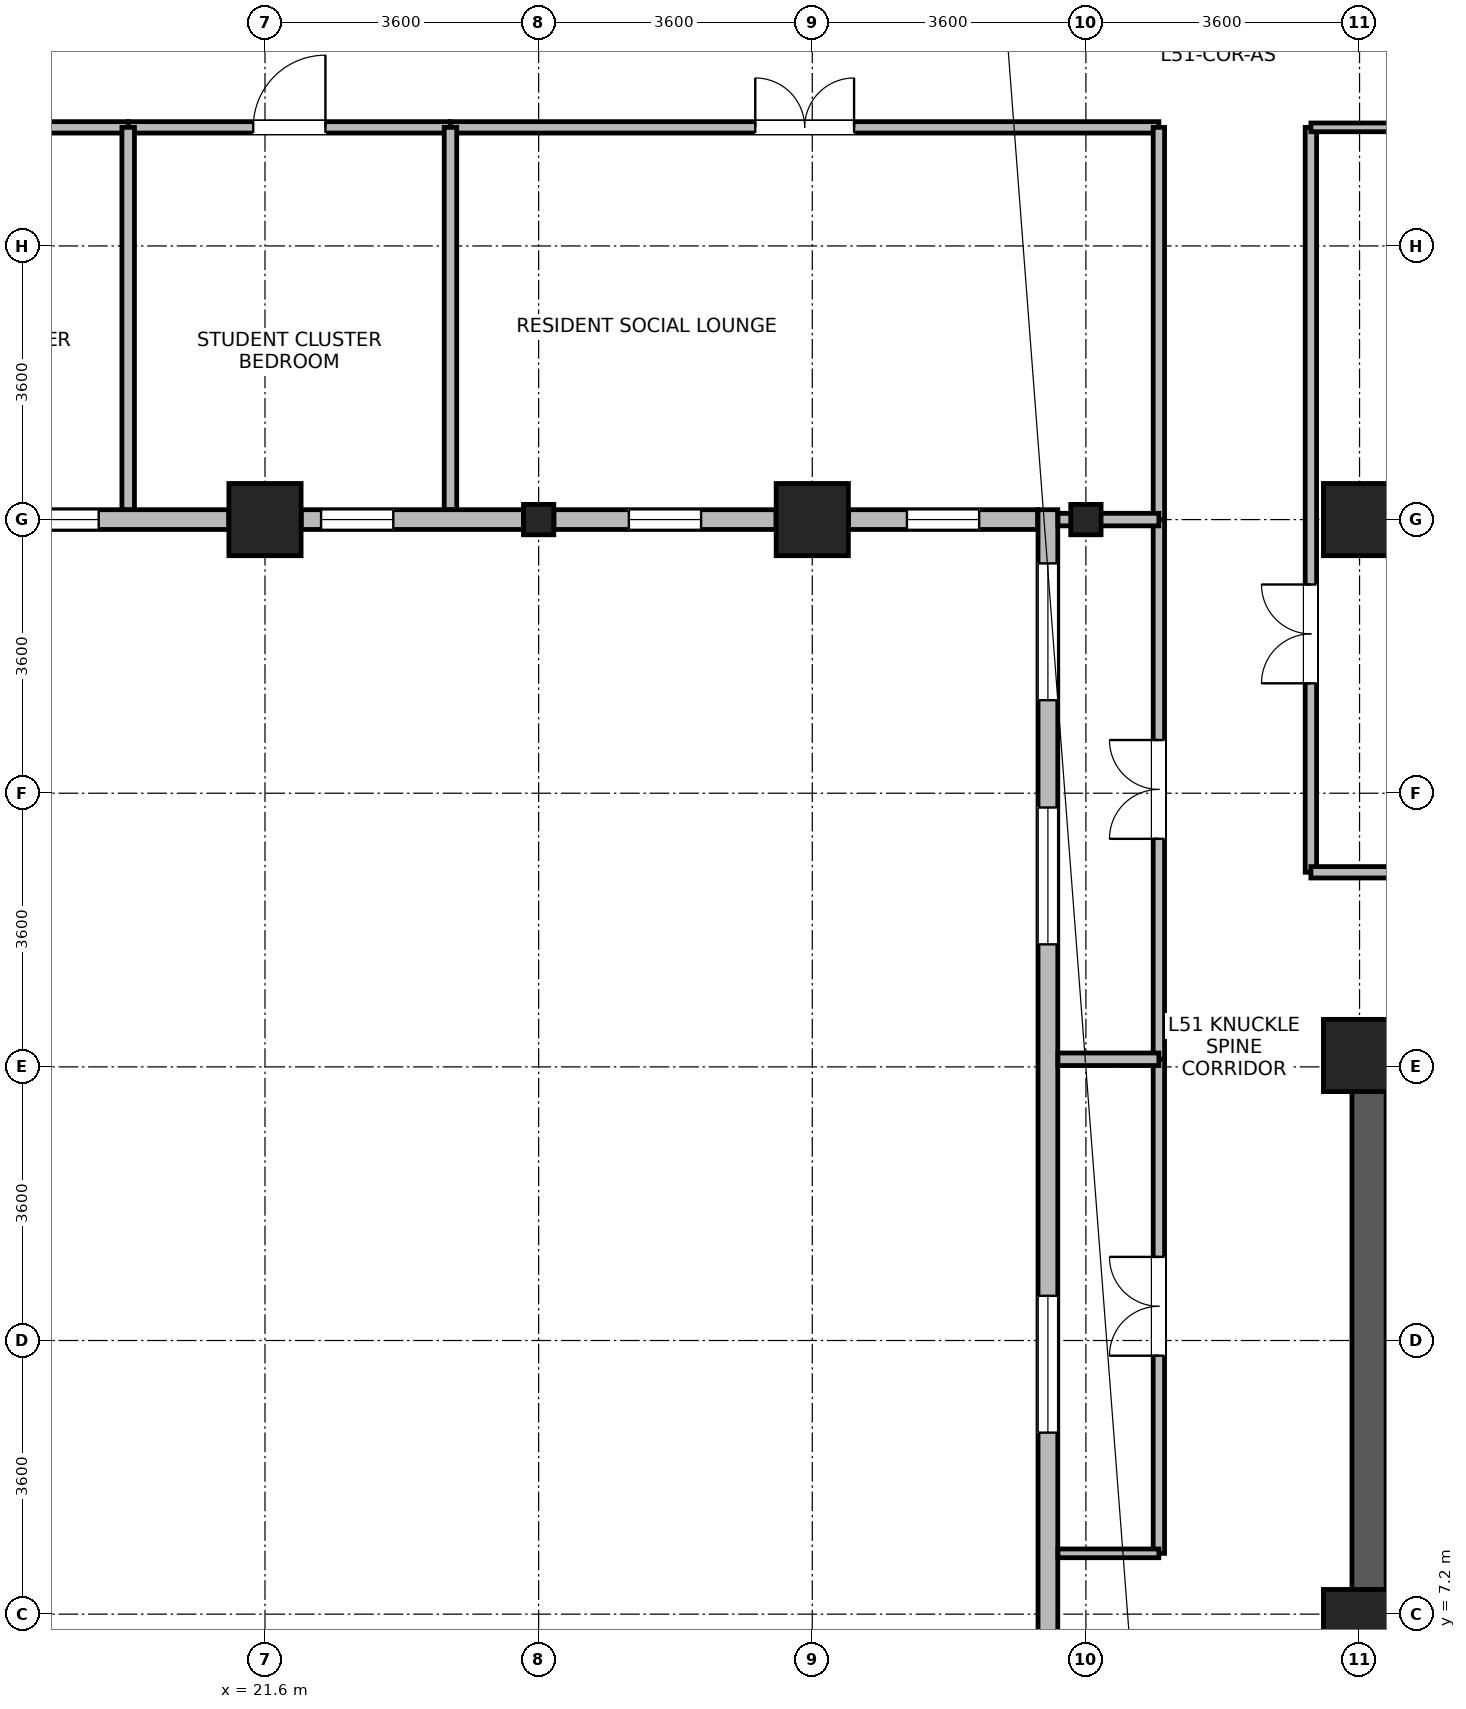
"""IFC4 building model, lengths in metres.
Left out: names, types, materials, properties, quantities, classifications, styles, units other than length and angle.
Written with IfcOpenShell. Run it as: python <this file> out.ifc"""

import sys

from ifc_helpers import new_model, si_unit, direction, frame, frame_2d, origin, origin_2d, place, context, subcontext, project, spatial, rectangle, i_section, extrude, source, transform, mapped, element, fill, save


model = new_model("IFC4")
c1 = context("Model", 3, precision=1e-05, world=origin(), true_north=direction((0.0, 1.0)))
c2 = subcontext(c1, "Body", "Model", "MODEL_VIEW")
j1 = project(units=[si_unit("LENGTHUNIT", "METRE"), si_unit("PLANEANGLEUNIT", "RADIAN")], contexts=[c1])
p1 = place(None, origin())
s1 = spatial("IfcSite", under=j1, at=p1, CompositionType="ELEMENT")
p2 = place(p1, origin())
s2 = spatial("IfcBuilding", under=s1, at=p2, CompositionType="ELEMENT")
p3 = place(p2, frame((0.0, 0.0, 201.8)))
s3 = spatial("IfcBuildingStorey", under=s2, at=p3, CompositionType="ELEMENT", Elevation=201.8)
p4 = place(p3, frame((36.125, 6.85, 0.0), z_axis=(0.0, 0.0, 1.0), x_axis=(0.0, 1.0, 0.0)))
e1 = element("IfcWall", 1, at=p4, inside=s3, PredefinedType="SHEAR", context=c2, shape_type="SweptSolid", body=[
    extrude(rectangle(XDim=7.9, YDim=0.45, at=frame_2d((3.95, 0.0))), origin(), (0.0, 0.0, 1.0), 3.47),
])
m1 = source(origin(), c2, "Body", "SweptSolid", [
    extrude(rectangle(XDim=0.95, YDim=0.95, at=origin_2d()), origin(), (0.0, 0.0, 1.0), 3.7),
])
for number, where, z_axis, x_axis in (
    (2, (21.6, 21.6, 0.0), (0.0, 0.0, 1.0), (1.0, 0.0, 0.0)),
    (3, (28.8, 21.6, 0.0), (0.0, 0.0, 1.0), (1.0, 0.0, 0.0)),
    (4, (36.0, 21.6, 0.0), (0.0, 0.0, 1.0), (1.0, 0.0, 0.0)),
    (5, (36.0, 7.05, 0.0), (0.0, 0.0, 1.0), (1.0, 0.0, 0.0)),
    (6, (36.0, 14.55, 0.0), (0.0, 0.0, 1.0), (1.0, 0.0, 0.0)),
):
    element("IfcColumn", number, at=place(p3, frame(where, z_axis=z_axis, x_axis=x_axis)), inside=s3, PredefinedType="COLUMN", context=c2, shape_type="MappedRepresentation", body=[
        mapped(m1, transform((0.0, 0.0, 0.0), x_axis=(1.0, 0.0, 0.0), y_axis=(0.0, 1.0, 0.0), z_axis=(0.0, 0.0, 1.0), scale=1.0)),
    ])
m2 = source(origin(), c2, "Body", "SweptSolid", [
    extrude(i_section(OverallWidth=0.399, OverallDepth=0.4, WebThickness=0.017, FlangeThickness=0.023, FilletRadius=0.015, at=origin_2d()), origin(), (0.0, 0.0, 1.0), 3.7),
])
for number, where, z_axis, x_axis in (
    (7, (25.2, 21.6, 0.0), (0.0, 0.0, 1.0), (1.0, 0.0, 0.0)),
    (8, (32.4, 21.6, 0.0), (0.0, 0.0, 1.0), (1.0, 0.0, 0.0)),
):
    element("IfcColumn", number, at=place(p3, frame(where, z_axis=z_axis, x_axis=x_axis)), inside=s3, PredefinedType="COLUMN", context=c2, shape_type="MappedRepresentation", body=[
        mapped(m2, transform((0.0, 0.0, 0.0), x_axis=(1.0, 0.0, 0.0), y_axis=(0.0, 1.0, 0.0), z_axis=(0.0, 0.0, 1.0), scale=1.0)),
    ])
p5 = place(p3, frame((21.124, 21.6, 0.0), z_axis=(0.0, 0.0, 1.0), x_axis=(-1.0, 0.0, 0.0)))
e9 = element("IfcWall", 9, at=p5, inside=s3, PredefinedType="STANDARD", context=c2, shape_type="SweptSolid", body=[
    extrude(rectangle(XDim=2.924, YDim=0.26, at=frame_2d((1.462, 0.0))), origin(), (0.0, 0.0, 1.0), 3.0),
])
p6 = place(p5, frame((1.712, 0.0, 0.85)))
e10 = element("IfcOpeningElement", 10, at=p6, cuts=e9, PredefinedType="OPENING", context=c2, shape_type="SweptSolid", body=[
    extrude(rectangle(XDim=0.95, YDim=1.75, at=frame_2d((0.475, 0.875))), frame((0.0, 0.14, 0.0), z_axis=(0.0, -1.0, 0.0), x_axis=(1.0, 0.0, 0.0)), (0.0, 0.0, 1.0), 0.28),
])
p7 = place(p3, frame((25.0, 21.6, 0.0), z_axis=(0.0, 0.0, 1.0), x_axis=(-1.0, 0.0, 0.0)))
e11 = element("IfcWall", 11, at=p7, inside=s3, PredefinedType="STANDARD", context=c2, shape_type="SweptSolid", body=[
    extrude(rectangle(XDim=2.924, YDim=0.26, at=frame_2d((1.462, 0.0))), origin(), (0.0, 0.0, 1.0), 3.0),
])
p8 = place(p7, frame((1.712, 0.0, 0.85)))
e12 = element("IfcOpeningElement", 12, at=p8, cuts=e11, PredefinedType="OPENING", context=c2, shape_type="SweptSolid", body=[
    extrude(rectangle(XDim=0.95, YDim=1.75, at=frame_2d((0.475, 0.875))), frame((0.0, 0.14, 0.0), z_axis=(0.0, -1.0, 0.0), x_axis=(1.0, 0.0, 0.0)), (0.0, 0.0, 1.0), 0.28),
])
p9 = place(p3, frame((28.324, 21.6, 0.0), z_axis=(0.0, 0.0, 1.0), x_axis=(-1.0, 0.0, 0.0)))
e13 = element("IfcWall", 13, at=p9, inside=s3, PredefinedType="STANDARD", context=c2, shape_type="SweptSolid", body=[
    extrude(rectangle(XDim=2.924, YDim=0.26, at=frame_2d((1.462, 0.0))), origin(), (0.0, 0.0, 1.0), 3.0),
])
p10 = place(p9, frame((0.987, 0.0, 0.85)))
e14 = element("IfcOpeningElement", 14, at=p10, cuts=e13, PredefinedType="OPENING", context=c2, shape_type="SweptSolid", body=[
    extrude(rectangle(XDim=0.95, YDim=1.75, at=frame_2d((0.475, 0.875))), frame((0.0, 0.14, 0.0), z_axis=(0.0, -1.0, 0.0), x_axis=(1.0, 0.0, 0.0)), (0.0, 0.0, 1.0), 0.28),
])
p11 = place(p3, frame((31.765, 21.6, 0.0), z_axis=(0.0, 0.0, 1.0), x_axis=(-1.0, 0.0, 0.0)))
e15 = element("IfcWall", 15, at=p11, inside=s3, PredefinedType="STANDARD", context=c2, shape_type="SweptSolid", body=[
    extrude(rectangle(XDim=2.489, YDim=0.26, at=frame_2d((1.245, 0.0))), origin(), (0.0, 0.0, 1.0), 3.0),
])
p12 = place(p11, frame((0.77, 0.0, 0.85)))
e16 = element("IfcOpeningElement", 16, at=p12, cuts=e15, PredefinedType="OPENING", context=c2, shape_type="SweptSolid", body=[
    extrude(rectangle(XDim=0.95, YDim=1.75, at=frame_2d((0.475, 0.875))), frame((0.0, 0.14, 0.0), z_axis=(0.0, -1.0, 0.0), x_axis=(1.0, 0.0, 0.0)), (0.0, 0.0, 1.0), 0.28),
])
p13 = place(p3, frame((31.9, 5.67, 0.0), z_axis=(0.0, 0.0, 1.0), x_axis=(0.0, 1.0, 0.0)))
e17 = element("IfcWall", 17, at=p13, inside=s3, PredefinedType="STANDARD", context=c2, shape_type="SweptSolid", body=[
    extrude(rectangle(XDim=16.06, YDim=0.26, at=frame_2d((8.03, 0.0))), origin(), (0.0, 0.0, 1.0), 3.45),
])
p14 = place(p13, frame((3.918, 0.0, 0.85)))
e18 = element("IfcOpeningElement", 18, at=p14, cuts=e17, PredefinedType="OPENING", context=c2, shape_type="SweptSolid", body=[
    extrude(rectangle(XDim=1.8, YDim=1.85, at=frame_2d((0.9, 0.925))), frame((0.0, 0.14, 0.0), z_axis=(0.0, -1.0, 0.0), x_axis=(1.0, 0.0, 0.0)), (0.0, 0.0, 1.0), 0.28),
])
p15 = place(p13, frame((10.342, 0.0, 0.85)))
e19 = element("IfcOpeningElement", 19, at=p15, cuts=e17, PredefinedType="OPENING", context=c2, shape_type="SweptSolid", body=[
    extrude(rectangle(XDim=1.8, YDim=1.85, at=frame_2d((0.9, 0.925))), frame((0.0, 0.14, 0.0), z_axis=(0.0, -1.0, 0.0), x_axis=(1.0, 0.0, 0.0)), (0.0, 0.0, 1.0), 0.28),
])
p16 = place(p13, frame((13.554, 0.0, 0.85)))
e20 = element("IfcOpeningElement", 20, at=p16, cuts=e17, PredefinedType="OPENING", context=c2, shape_type="SweptSolid", body=[
    extrude(rectangle(XDim=1.8, YDim=1.85, at=frame_2d((0.9, 0.925))), frame((0.0, 0.14, 0.0), z_axis=(0.0, -1.0, 0.0), x_axis=(1.0, 0.0, 0.0)), (0.0, 0.0, 1.0), 0.28),
])
p17 = place(p3, frame((35.36, 16.96, 0.0), z_axis=(0.0, 0.0, 1.0), x_axis=(0.0, 1.0, 0.0)))
e21 = element("IfcWall", 21, at=p17, inside=s3, PredefinedType="PARTITIONING", context=c2, shape_type="SweptSolid", body=[
    extrude(rectangle(XDim=9.8, YDim=0.15, at=frame_2d((4.9, 0.0))), origin(), (0.0, 0.0, 1.0), 3.45),
])
p18 = place(p17, frame((2.486, 0.0, 0.0)))
e22 = element("IfcOpeningElement", 22, at=p18, cuts=e21, PredefinedType="OPENING", context=c2, shape_type="SweptSolid", body=[
    extrude(rectangle(XDim=1.3, YDim=2.12, at=frame_2d((0.65, 1.06))), frame((0.0, 0.085, 0.0), z_axis=(0.0, -1.0, 0.0), x_axis=(1.0, 0.0, 0.0)), (0.0, 0.0, 1.0), 0.17),
])
p19 = place(p3, frame((24.04, 26.76, 0.0), z_axis=(0.0, 0.0, 1.0), x_axis=(1.0, 0.0, 0.0)))
e23 = element("IfcWall", 23, at=p19, inside=s3, PredefinedType="PARTITIONING", context=c2, shape_type="SweptSolid", body=[
    extrude(rectangle(XDim=9.32, YDim=0.15, at=frame_2d((4.66, 0.0))), origin(), (0.0, 0.0, 1.0), 3.45),
])
p20 = place(p19, frame((4.01, 0.0, 0.0)))
e24 = element("IfcOpeningElement", 24, at=p20, cuts=e23, PredefinedType="OPENING", context=c2, shape_type="SweptSolid", body=[
    extrude(rectangle(XDim=1.3, YDim=2.12, at=frame_2d((0.65, 1.06))), frame((0.0, 0.085, 0.0), z_axis=(0.0, -1.0, 0.0), x_axis=(1.0, 0.0, 0.0)), (0.0, 0.0, 1.0), 0.17),
])
p21 = place(p3, frame((35.36, 16.96, 0.0), z_axis=(0.0, 0.0, 1.0), x_axis=(1.0, 0.0, 0.0)))
e25 = element("IfcWall", 25, at=p21, inside=s3, PredefinedType="PARTITIONING", context=c2, shape_type="SweptSolid", body=[
    extrude(rectangle(XDim=9.16, YDim=0.15, at=frame_2d((4.58, 0.0))), origin(), (0.0, 0.0, 1.0), 3.45),
])
p22 = place(p3, frame((33.36, 14.5, 0.0), z_axis=(0.0, 0.0, 1.0), x_axis=(0.0, 1.0, 0.0)))
e26 = element("IfcWall", 26, at=p22, inside=s3, PredefinedType="PARTITIONING", context=c2, shape_type="SweptSolid", body=[
    extrude(rectangle(XDim=7.1, YDim=0.15, at=frame_2d((3.55, 0.0))), origin(), (0.0, 0.0, 1.0), 3.45),
])
p23 = place(p22, frame((2.9, 0.0, 0.0)))
e27 = element("IfcOpeningElement", 27, at=p23, cuts=e26, PredefinedType="OPENING", context=c2, shape_type="SweptSolid", body=[
    extrude(rectangle(XDim=1.3, YDim=2.12, at=frame_2d((0.65, 1.06))), frame((0.0, 0.085, 0.0), z_axis=(0.0, -1.0, 0.0), x_axis=(1.0, 0.0, 0.0)), (0.0, 0.0, 1.0), 0.17),
])
p24 = place(p3, frame((33.36, 8.0, 0.0), z_axis=(0.0, 0.0, 1.0), x_axis=(0.0, 1.0, 0.0)))
e28 = element("IfcWall", 28, at=p24, inside=s3, PredefinedType="PARTITIONING", context=c2, shape_type="SweptSolid", body=[
    extrude(rectangle(XDim=6.5, YDim=0.15, at=frame_2d((3.25, 0.0))), origin(), (0.0, 0.0, 1.0), 3.45),
])
p25 = place(p24, frame((2.6, 0.0, 0.0)))
e29 = element("IfcOpeningElement", 29, at=p25, cuts=e28, PredefinedType="OPENING", context=c2, shape_type="SweptSolid", body=[
    extrude(rectangle(XDim=1.3, YDim=2.12, at=frame_2d((0.65, 1.06))), frame((0.0, 0.085, 0.0), z_axis=(0.0, -1.0, 0.0), x_axis=(1.0, 0.0, 0.0)), (0.0, 0.0, 1.0), 0.17),
])
p26 = place(p3, frame((33.36, 21.6, 0.0), z_axis=(0.0, 0.0, 1.0), x_axis=(0.0, 1.0, 0.0)))
e30 = element("IfcWall", 30, at=p26, inside=s3, PredefinedType="PARTITIONING", context=c2, shape_type="SweptSolid", body=[
    extrude(rectangle(XDim=5.16, YDim=0.15, at=frame_2d((2.58, 0.0))), origin(), (0.0, 0.0, 1.0), 3.45),
])
p27 = place(p3, frame((19.8, 26.76, 0.0), z_axis=(0.0, 0.0, 1.0), x_axis=(1.0, 0.0, 0.0)))
e31 = element("IfcWall", 31, at=p27, inside=s3, PredefinedType="PARTITIONING", context=c2, shape_type="SweptSolid", body=[
    extrude(rectangle(XDim=4.24, YDim=0.15, at=frame_2d((2.12, 0.0))), origin(), (0.0, 0.0, 1.0), 3.45),
])
p28 = place(p27, frame((1.645, 0.0, 0.0)))
e32 = element("IfcOpeningElement", 32, at=p28, cuts=e31, PredefinedType="OPENING", context=c2, shape_type="SweptSolid", body=[
    extrude(rectangle(XDim=0.95, YDim=2.1, at=frame_2d((0.475, 1.05))), frame((0.0, 0.085, 0.0), z_axis=(0.0, -1.0, 0.0), x_axis=(1.0, 0.0, 0.0)), (0.0, 0.0, 1.0), 0.17),
])
p29 = place(p3, frame((15.86, 26.76, 0.0), z_axis=(0.0, 0.0, 1.0), x_axis=(1.0, 0.0, 0.0)))
e33 = element("IfcWall", 33, at=p29, inside=s3, PredefinedType="PARTITIONING", context=c2, shape_type="SweptSolid", body=[
    extrude(rectangle(XDim=3.94, YDim=0.15, at=frame_2d((1.97, 0.0))), origin(), (0.0, 0.0, 1.0), 3.45),
])
p30 = place(p29, frame((1.495, 0.0, 0.0)))
e34 = element("IfcOpeningElement", 34, at=p30, cuts=e33, PredefinedType="OPENING", context=c2, shape_type="SweptSolid", body=[
    extrude(rectangle(XDim=0.95, YDim=2.1, at=frame_2d((0.475, 1.05))), frame((0.0, 0.085, 0.0), z_axis=(0.0, -1.0, 0.0), x_axis=(1.0, 0.0, 0.0)), (0.0, 0.0, 1.0), 0.17),
])
p31 = place(p3, frame((35.36, 26.76, 0.0), z_axis=(0.0, 0.0, 1.0), x_axis=(1.0, 0.0, 0.0)))
e35 = element("IfcWall", 35, at=p31, inside=s3, PredefinedType="PARTITIONING", context=c2, shape_type="SweptSolid", body=[
    extrude(rectangle(XDim=9.16, YDim=0.115, at=frame_2d((4.58, 0.0))), origin(), (0.0, 0.0, 1.0), 3.45),
])
for number, where, z_axis, x_axis in (
    (36, (19.8, 21.732, 0.0), (0.0, 0.0, 1.0), (0.0, 1.0, 0.0)),
    (37, (24.04, 21.732, 0.0), (0.0, 0.0, 1.0), (0.0, 1.0, 0.0)),
):
    element("IfcWall", number, at=place(p3, frame(where, z_axis=z_axis, x_axis=x_axis)), inside=s3, PredefinedType="PARTITIONING", context=c2, shape_type="SweptSolid", body=[
        extrude(rectangle(XDim=5.028, YDim=0.165, at=frame_2d((2.514, 0.0))), origin(), (0.0, 0.0, 1.0), 3.45),
    ])
p32 = place(p3, frame((32.032, 8.0, 0.0), z_axis=(0.0, 0.0, 1.0), x_axis=(1.0, 0.0, 0.0)))
e38 = element("IfcWall", 38, at=p32, inside=s3, PredefinedType="PARTITIONING", context=c2, shape_type="SweptSolid", body=[
    extrude(rectangle(XDim=1.328, YDim=0.115, at=frame_2d((0.664, 0.0))), origin(), (0.0, 0.0, 1.0), 3.45),
])
p33 = place(p3, frame((32.032, 14.5, 0.0), z_axis=(0.0, 0.0, 1.0), x_axis=(1.0, 0.0, 0.0)))
e39 = element("IfcWall", 39, at=p33, inside=s3, PredefinedType="PARTITIONING", context=c2, shape_type="SweptSolid", body=[
    extrude(rectangle(XDim=1.328, YDim=0.165, at=frame_2d((0.664, 0.0))), origin(), (0.0, 0.0, 1.0), 3.45),
])
p34 = place(p3, frame((32.032, 21.6, 0.0), z_axis=(0.0, 0.0, 1.0), x_axis=(1.0, 0.0, 0.0)))
e40 = element("IfcWall", 40, at=p34, inside=s3, PredefinedType="PARTITIONING", context=c2, shape_type="SweptSolid", body=[
    extrude(rectangle(XDim=1.328, YDim=0.165, at=frame_2d((0.664, 0.0))), origin(), (0.0, 0.0, 1.0), 3.0),
])
p35 = place(p6, origin())
e41 = element("IfcWindow", 41, at=p35, inside=s3, PartitioningType="SINGLE_PANEL", PredefinedType="WINDOW", context=c2, shape_type="SweptSolid", body=[
    extrude(rectangle(XDim=0.95, YDim=1.75, at=frame_2d((0.475, 0.875))), frame((0.0, 0.03, 0.0), z_axis=(0.0, -1.0, 0.0), x_axis=(1.0, 0.0, 0.0)), (0.0, 0.0, 1.0), 0.06),
])
fill(e10, e41)
p36 = place(p8, origin())
e42 = element("IfcWindow", 42, at=p36, inside=s3, PartitioningType="SINGLE_PANEL", PredefinedType="WINDOW", context=c2, shape_type="SweptSolid", body=[
    extrude(rectangle(XDim=0.95, YDim=1.75, at=frame_2d((0.475, 0.875))), frame((0.0, 0.03, 0.0), z_axis=(0.0, -1.0, 0.0), x_axis=(1.0, 0.0, 0.0)), (0.0, 0.0, 1.0), 0.06),
])
fill(e12, e42)
p37 = place(p10, origin())
e43 = element("IfcWindow", 43, at=p37, inside=s3, PartitioningType="SINGLE_PANEL", PredefinedType="WINDOW", context=c2, shape_type="SweptSolid", body=[
    extrude(rectangle(XDim=0.95, YDim=1.75, at=frame_2d((0.475, 0.875))), frame((0.0, 0.03, 0.0), z_axis=(0.0, -1.0, 0.0), x_axis=(1.0, 0.0, 0.0)), (0.0, 0.0, 1.0), 0.06),
])
fill(e14, e43)
p38 = place(p12, origin())
e44 = element("IfcWindow", 44, at=p38, inside=s3, PartitioningType="SINGLE_PANEL", PredefinedType="WINDOW", context=c2, shape_type="SweptSolid", body=[
    extrude(rectangle(XDim=0.95, YDim=1.75, at=frame_2d((0.475, 0.875))), frame((0.0, 0.03, 0.0), z_axis=(0.0, -1.0, 0.0), x_axis=(1.0, 0.0, 0.0)), (0.0, 0.0, 1.0), 0.06),
])
fill(e16, e44)
p39 = place(p14, origin())
e45 = element("IfcWindow", 45, at=p39, inside=s3, PartitioningType="SINGLE_PANEL", PredefinedType="WINDOW", context=c2, shape_type="SweptSolid", body=[
    extrude(rectangle(XDim=1.8, YDim=1.85, at=frame_2d((0.9, 0.925))), frame((0.0, 0.03, 0.0), z_axis=(0.0, -1.0, 0.0), x_axis=(1.0, 0.0, 0.0)), (0.0, 0.0, 1.0), 0.06),
])
fill(e18, e45)
p40 = place(p15, origin())
e46 = element("IfcWindow", 46, at=p40, inside=s3, PartitioningType="SINGLE_PANEL", PredefinedType="WINDOW", context=c2, shape_type="SweptSolid", body=[
    extrude(rectangle(XDim=1.8, YDim=1.85, at=frame_2d((0.9, 0.925))), frame((0.0, 0.03, 0.0), z_axis=(0.0, -1.0, 0.0), x_axis=(1.0, 0.0, 0.0)), (0.0, 0.0, 1.0), 0.06),
])
fill(e19, e46)
p41 = place(p16, origin())
e47 = element("IfcWindow", 47, at=p41, inside=s3, PartitioningType="SINGLE_PANEL", PredefinedType="WINDOW", context=c2, shape_type="SweptSolid", body=[
    extrude(rectangle(XDim=1.8, YDim=1.85, at=frame_2d((0.9, 0.925))), frame((0.0, 0.03, 0.0), z_axis=(0.0, -1.0, 0.0), x_axis=(1.0, 0.0, 0.0)), (0.0, 0.0, 1.0), 0.06),
])
fill(e20, e47)
p42 = place(p18, origin())
e48 = element("IfcDoor", 48, at=p42, inside=s3, OperationType="DOUBLE_DOOR_SINGLE_SWING", PredefinedType="DOOR", context=c2, shape_type="SweptSolid", body=[
    extrude(rectangle(XDim=1.3, YDim=2.12, at=frame_2d((0.65, 1.06))), frame((0.0, 0.025, 0.0), z_axis=(0.0, -1.0, 0.0), x_axis=(1.0, 0.0, 0.0)), (0.0, 0.0, 1.0), 0.05),
])
fill(e22, e48)
p43 = place(p20, origin())
e49 = element("IfcDoor", 49, at=p43, inside=s3, OperationType="DOUBLE_DOOR_SINGLE_SWING", PredefinedType="DOOR", context=c2, shape_type="SweptSolid", body=[
    extrude(rectangle(XDim=1.3, YDim=2.12, at=frame_2d((0.65, 1.06))), frame((0.0, 0.025, 0.0), z_axis=(0.0, -1.0, 0.0), x_axis=(1.0, 0.0, 0.0)), (0.0, 0.0, 1.0), 0.05),
])
fill(e24, e49)
p44 = place(p23, origin())
e50 = element("IfcDoor", 50, at=p44, inside=s3, OperationType="DOUBLE_DOOR_SINGLE_SWING", PredefinedType="DOOR", context=c2, shape_type="SweptSolid", body=[
    extrude(rectangle(XDim=1.3, YDim=2.12, at=frame_2d((0.65, 1.06))), frame((0.0, 0.025, 0.0), z_axis=(0.0, -1.0, 0.0), x_axis=(1.0, 0.0, 0.0)), (0.0, 0.0, 1.0), 0.05),
])
fill(e27, e50)
p45 = place(p25, origin())
e51 = element("IfcDoor", 51, at=p45, inside=s3, OperationType="DOUBLE_DOOR_SINGLE_SWING", PredefinedType="DOOR", context=c2, shape_type="SweptSolid", body=[
    extrude(rectangle(XDim=1.3, YDim=2.12, at=frame_2d((0.65, 1.06))), frame((0.0, 0.025, 0.0), z_axis=(0.0, -1.0, 0.0), x_axis=(1.0, 0.0, 0.0)), (0.0, 0.0, 1.0), 0.05),
])
fill(e29, e51)
p46 = place(p28, origin())
e52 = element("IfcDoor", 52, at=p46, inside=s3, OperationType="SINGLE_SWING_RIGHT", PredefinedType="DOOR", context=c2, shape_type="SweptSolid", body=[
    extrude(rectangle(XDim=0.95, YDim=2.1, at=frame_2d((0.475, 1.05))), frame((0.0, 0.025, 0.0), z_axis=(0.0, -1.0, 0.0), x_axis=(1.0, 0.0, 0.0)), (0.0, 0.0, 1.0), 0.05),
])
fill(e32, e52)
save(model, sys.argv[1])
